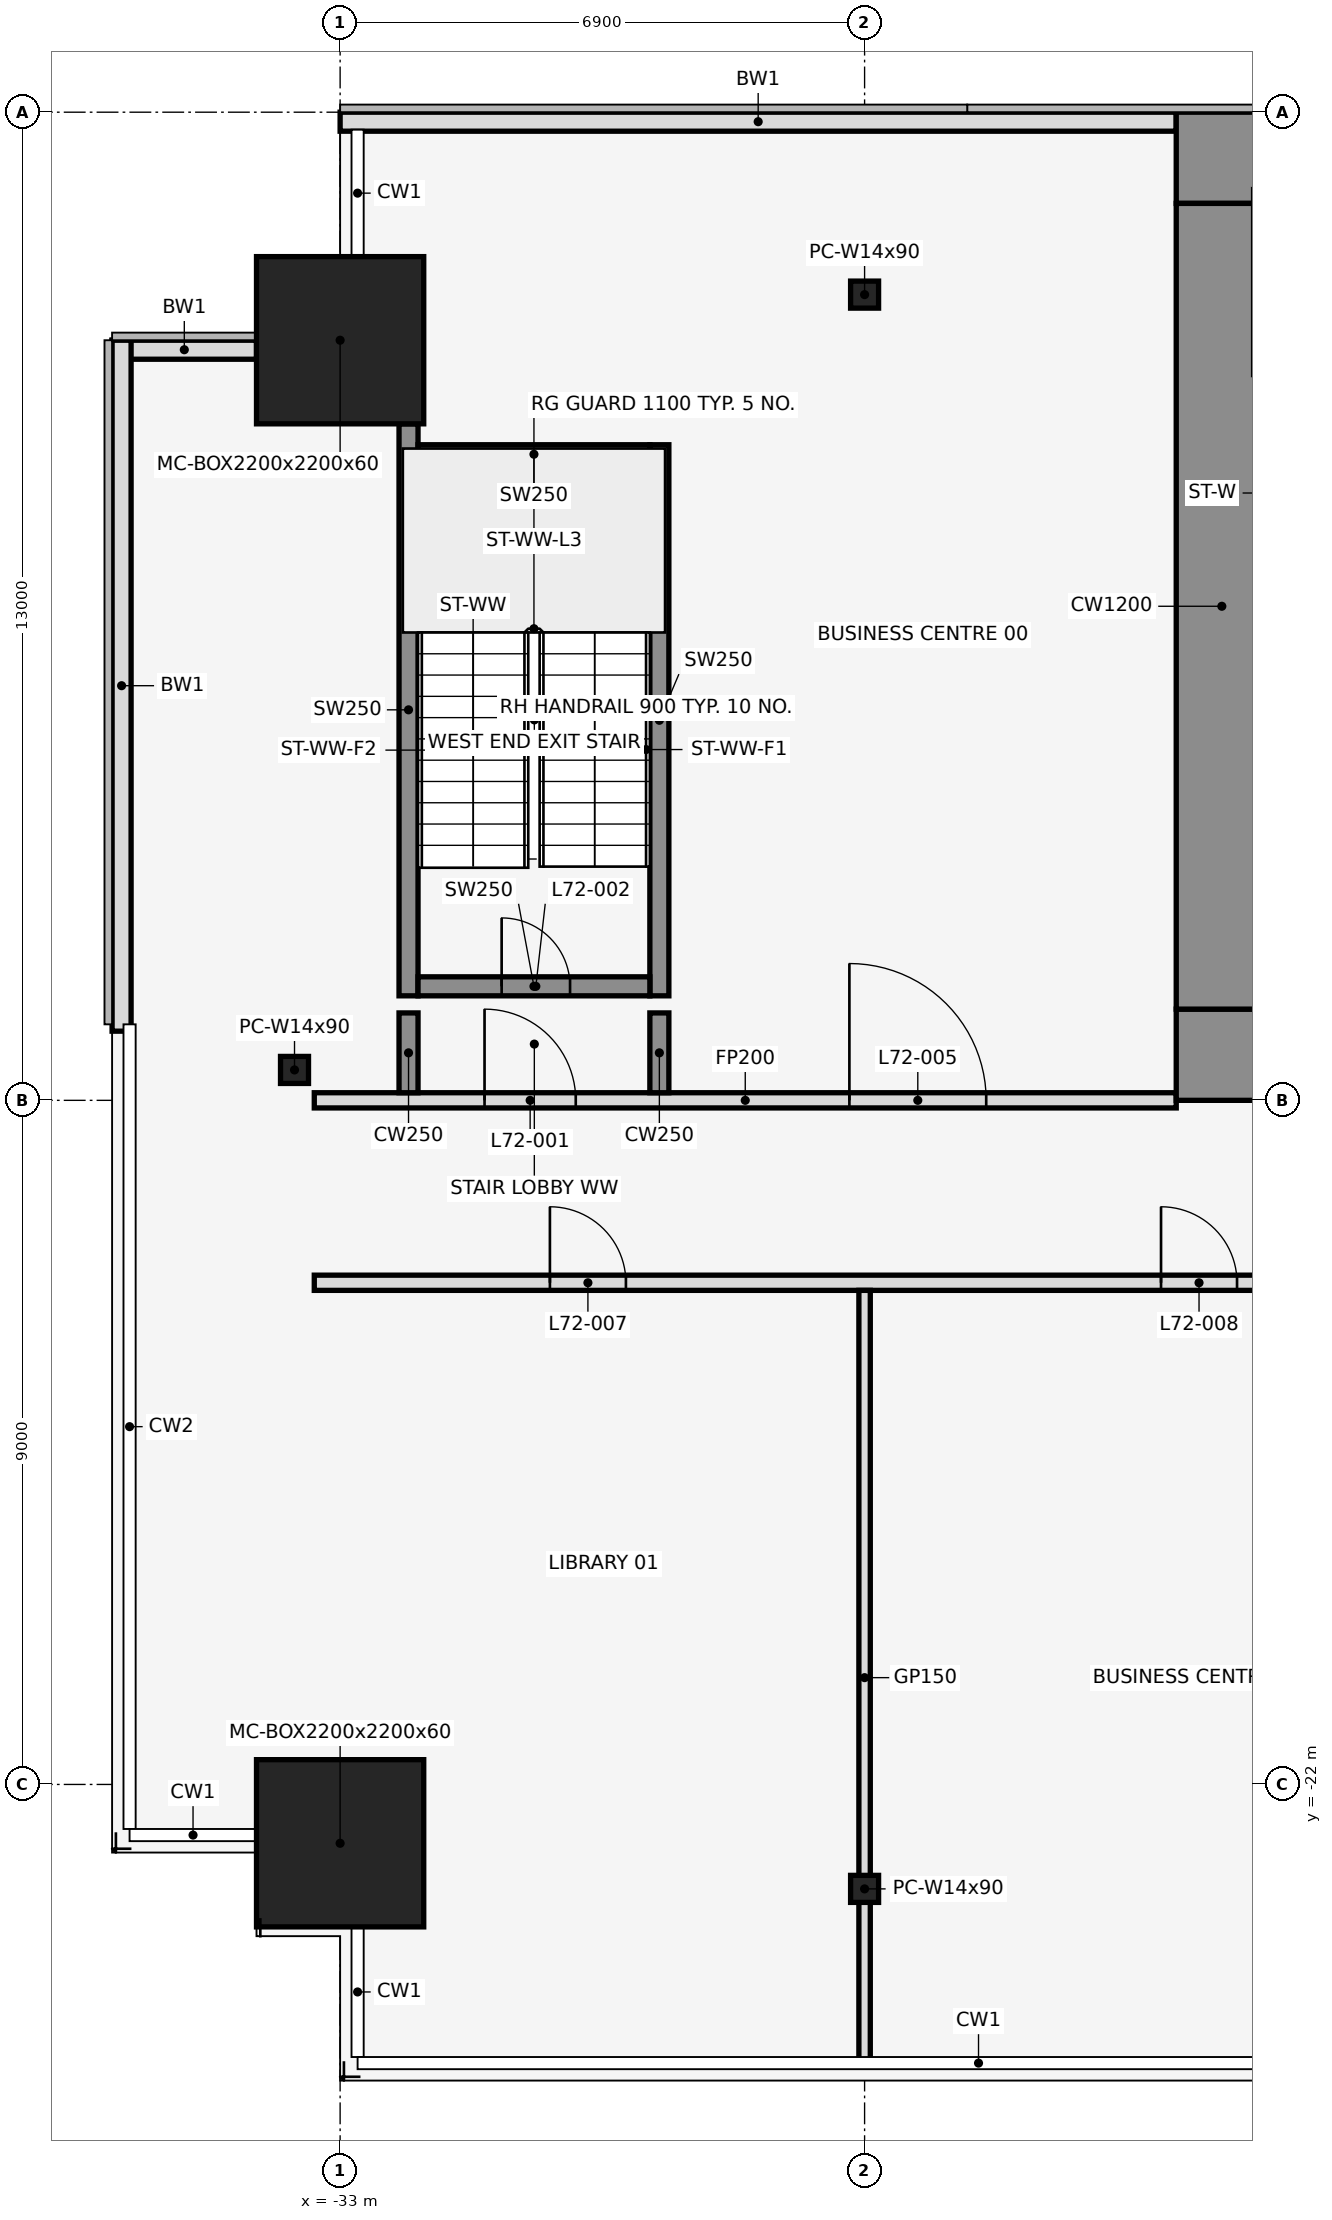
"""IFC4 building model, lengths in metres.
Left out: names, types, materials, properties, quantities, classifications, styles, units other than length and angle.
Written with IfcOpenShell. Run it as: python <this file> out.ifc"""

import sys

from ifc_helpers import new_model, si_unit, direction, frame, frame_2d, origin, origin_2d, place, context, subcontext, project, spatial, rectangle, hollow_rectangle, i_section, extrude, element, fill, save


model = new_model("IFC4")
c1 = context("Model", 3, precision=1e-05, world=origin(), true_north=direction((0.0, 1.0)))
c2 = subcontext(c1, "Body", "Model", "MODEL_VIEW")
j1 = project(units=[si_unit("LENGTHUNIT", "METRE"), si_unit("PLANEANGLEUNIT", "RADIAN")], contexts=[c1])
p1 = place(None, origin())
s1 = spatial("IfcSite", under=j1, at=p1, CompositionType="ELEMENT")
p2 = place(p1, origin())
s2 = spatial("IfcBuilding", under=s1, at=p2, CompositionType="ELEMENT")
p3 = place(p2, frame((0.0, 0.0, 320.0)))
s3 = spatial("IfcBuildingStorey", under=s2, at=p3, CompositionType="ELEMENT", Elevation=320.0)
for number, where, z_axis, x_axis in (
    (1, (-33.0, -22.774, 0.0), (0.0, 0.0, 1.0), (1.0, 0.0, 0.0)),
    (2, (-33.0, -3.0, 0.0), (0.0, 0.0, 1.0), (1.0, 0.0, 0.0)),
):
    element("IfcColumn", number, at=place(p3, frame(where, z_axis=z_axis, x_axis=x_axis)), inside=s3, PredefinedType="COLUMN", context=c2, shape_type="SweptSolid", body=[
        extrude(hollow_rectangle(XDim=2.2, YDim=2.2, WallThickness=0.06, at=origin_2d()), origin(), (0.0, 0.0, 1.0), 4.5),
    ])
for number, where, z_axis, x_axis in (
    (3, (-26.1, -23.374, 0.0), (0.0, 0.0, 1.0), (1.0, 0.0, 0.0)),
    (4, (-26.1, -2.4, 0.0), (0.0, 0.0, 1.0), (1.0, 0.0, 0.0)),
    (5, (-33.6, -12.6, 0.0), (0.0, 0.0, 1.0), (1.0, 0.0, 0.0)),
):
    element("IfcColumn", number, at=place(p3, frame(where, z_axis=z_axis, x_axis=x_axis)), inside=s3, PredefinedType="COLUMN", context=c2, shape_type="SweptSolid", body=[
        extrude(i_section(OverallWidth=0.368, OverallDepth=0.356, WebThickness=0.011, FlangeThickness=0.018, at=origin_2d()), origin(), (0.0, 0.0, 1.0), 4.5),
    ])
p4 = place(p3, frame((-22.0, -0.125, 0.0), z_axis=(0.0, 0.0, 1.0), x_axis=(-1.0, 0.0, 0.0)))
e6 = element("IfcWall", 6, at=p4, inside=s3, PredefinedType="STANDARD", context=c2, shape_type="SweptSolid", body=[
    extrude(rectangle(XDim=11.0, YDim=0.25, at=frame_2d((5.5, 0.0))), origin(), (0.0, 0.0, 1.0), 4.35),
])
p5 = place(p3, frame((-34.1, -3.125, 0.0), z_axis=(0.0, 0.0, 1.0), x_axis=(-1.0, 0.0, 0.0)))
e7 = element("IfcWall", 7, at=p5, inside=s3, PredefinedType="STANDARD", context=c2, shape_type="SweptSolid", body=[
    extrude(rectangle(XDim=1.9, YDim=0.25, at=frame_2d((0.95, 0.0))), origin(), (0.0, 0.0, 1.0), 4.35),
])
p6 = place(p3, frame((-35.875, -3.0, 0.0), z_axis=(0.0, 0.0, 1.0), x_axis=(0.0, -1.0, 0.0)))
e8 = element("IfcWall", 8, at=p6, inside=s3, PredefinedType="STANDARD", context=c2, shape_type="SweptSolid", body=[
    extrude(rectangle(XDim=9.09, YDim=0.25, at=frame_2d((4.545, 0.0))), origin(), (0.0, 0.0, 1.0), 4.35),
])
p7 = place(p3, frame((-32.1, -11.625, 0.0), z_axis=(0.0, 0.0, 1.0), x_axis=(0.0, 1.0, 0.0)))
e9 = element("IfcWall", 9, at=p7, inside=s3, PredefinedType="SHEAR", context=c2, shape_type="SweptSolid", body=[
    extrude(rectangle(XDim=7.525, YDim=0.25, at=frame_2d((3.762, 0.0))), origin(), (0.0, 0.0, 1.0), 4.5),
])
p8 = place(p3, frame((-28.8, -11.625, 0.0), z_axis=(0.0, 0.0, 1.0), x_axis=(0.0, 1.0, 0.0)))
e10 = element("IfcWall", 10, at=p8, inside=s3, PredefinedType="SHEAR", context=c2, shape_type="SweptSolid", body=[
    extrude(rectangle(XDim=7.25, YDim=0.25, at=frame_2d((3.625, 0.0))), origin(), (0.0, 0.0, 1.0), 4.5),
])
p9 = place(p3, frame((-31.975, -11.5, 0.0), z_axis=(0.0, 0.0, 1.0), x_axis=(1.0, 0.0, 0.0)))
e11 = element("IfcWall", 11, at=p9, inside=s3, PredefinedType="SHEAR", context=c2, shape_type="SweptSolid", body=[
    extrude(rectangle(XDim=3.05, YDim=0.25, at=frame_2d((1.525, 0.0))), origin(), (0.0, 0.0, 1.0), 4.5),
])
p10 = place(p9, frame((1.1, 0.0, 0.0)))
e12 = element("IfcOpeningElement", 12, at=p10, cuts=e11, PredefinedType="OPENING", context=c2, shape_type="SweptSolid", body=[
    extrude(rectangle(XDim=0.9, YDim=2.1, at=frame_2d((0.45, 1.05))), frame((0.0, 0.137, 0.0), z_axis=(0.0, -1.0, 0.0), x_axis=(1.0, 0.0, 0.0)), (0.0, 0.0, 1.0), 0.274),
])
p11 = place(p3, frame((-31.975, -4.5, 0.0), z_axis=(0.0, 0.0, 1.0), x_axis=(1.0, 0.0, 0.0)))
e13 = element("IfcWall", 13, at=p11, inside=s3, PredefinedType="SHEAR", context=c2, shape_type="SweptSolid", body=[
    extrude(rectangle(XDim=3.05, YDim=0.25, at=frame_2d((1.525, 0.0))), origin(), (0.0, 0.0, 1.0), 4.5),
])
p12 = place(p3, frame((-33.34, -15.4, 0.0), z_axis=(0.0, 0.0, 1.0), x_axis=(1.0, 0.0, 0.0)))
e14 = element("IfcWall", 14, at=p12, inside=s3, PredefinedType="PARTITIONING", context=c2, shape_type="SweptSolid", body=[
    extrude(rectangle(XDim=31.94, YDim=0.2, at=frame_2d((15.97, 0.0))), origin(), (0.0, 0.0, 1.0), 3.418),
])
p13 = place(p12, frame((3.1, 0.0, 0.0)))
e15 = element("IfcOpeningElement", 15, at=p13, cuts=e14, PredefinedType="OPENING", context=c2, shape_type="SweptSolid", body=[
    extrude(rectangle(XDim=1.0, YDim=2.1, at=frame_2d((0.5, 1.05))), frame((0.0, 0.112, 0.0), z_axis=(0.0, -1.0, 0.0), x_axis=(1.0, 0.0, 0.0)), (0.0, 0.0, 1.0), 0.224),
])
p14 = place(p12, frame((11.14, 0.0, 0.0)))
e16 = element("IfcOpeningElement", 16, at=p14, cuts=e14, PredefinedType="OPENING", context=c2, shape_type="SweptSolid", body=[
    extrude(rectangle(XDim=1.0, YDim=2.1, at=frame_2d((0.5, 1.05))), frame((0.0, 0.112, 0.0), z_axis=(0.0, -1.0, 0.0), x_axis=(1.0, 0.0, 0.0)), (0.0, 0.0, 1.0), 0.224),
])
p15 = place(p12, frame((16.94, 0.0, 0.0)))
e17 = element("IfcOpeningElement", 17, at=p15, cuts=e14, PredefinedType="OPENING", context=c2, shape_type="SweptSolid", body=[
    extrude(rectangle(XDim=0.9, YDim=2.1, at=frame_2d((0.45, 1.05))), frame((0.0, 0.112, 0.0), z_axis=(0.0, -1.0, 0.0), x_axis=(1.0, 0.0, 0.0)), (0.0, 0.0, 1.0), 0.224),
])
p16 = place(p12, frame((22.74, 0.0, 0.0)))
e18 = element("IfcOpeningElement", 18, at=p16, cuts=e14, PredefinedType="OPENING", context=c2, shape_type="SweptSolid", body=[
    extrude(rectangle(XDim=0.9, YDim=2.1, at=frame_2d((0.45, 1.05))), frame((0.0, 0.112, 0.0), z_axis=(0.0, -1.0, 0.0), x_axis=(1.0, 0.0, 0.0)), (0.0, 0.0, 1.0), 0.224),
])
p17 = place(p3, frame((-33.34, -13.0, 0.0), z_axis=(0.0, 0.0, 1.0), x_axis=(1.0, 0.0, 0.0)))
e19 = element("IfcWall", 19, at=p17, inside=s3, PredefinedType="PARTITIONING", context=c2, shape_type="SweptSolid", body=[
    extrude(rectangle(XDim=11.34, YDim=0.2, at=frame_2d((5.67, 0.0))), origin(), (0.0, 0.0, 1.0), 3.418),
])
p18 = place(p17, frame((2.24, 0.0, 0.0)))
e20 = element("IfcOpeningElement", 20, at=p18, cuts=e19, PredefinedType="OPENING", context=c2, shape_type="SweptSolid", body=[
    extrude(rectangle(XDim=1.2, YDim=2.1, at=frame_2d((0.6, 1.05))), frame((0.0, 0.112, 0.0), z_axis=(0.0, -1.0, 0.0), x_axis=(1.0, 0.0, 0.0)), (0.0, 0.0, 1.0), 0.224),
])
p19 = place(p17, frame((7.04, 0.0, 0.0)))
e21 = element("IfcOpeningElement", 21, at=p19, cuts=e19, PredefinedType="OPENING", context=c2, shape_type="SweptSolid", body=[
    extrude(rectangle(XDim=1.8, YDim=2.1, at=frame_2d((0.9, 1.05))), frame((0.0, 0.112, 0.0), z_axis=(0.0, -1.0, 0.0), x_axis=(1.0, 0.0, 0.0)), (0.0, 0.0, 1.0), 0.224),
])
for number, where, z_axis, x_axis in (
    (22, (-32.1, -12.9, 0.0), (0.0, 0.0, 1.0), (0.0, 1.0, 0.0)),
    (23, (-28.8, -12.9, 0.0), (0.0, 0.0, 1.0), (0.0, 1.0, 0.0)),
):
    element("IfcWall", number, at=place(p3, frame(where, z_axis=z_axis, x_axis=x_axis)), inside=s3, PredefinedType="SHEAR", context=c2, shape_type="SweptSolid", body=[
        extrude(rectangle(XDim=1.05, YDim=0.25, at=frame_2d((0.525, 0.0))), origin(), (0.0, 0.0, 1.0), 4.5),
    ])
p20 = place(p3, frame((-26.1, -25.69, 0.0), z_axis=(0.0, 0.0, 1.0), x_axis=(0.0, 1.0, 0.0)))
e24 = element("IfcWall", 24, at=p20, inside=s3, PredefinedType="PARTITIONING", context=c2, shape_type="SweptSolid", body=[
    extrude(rectangle(XDim=10.19, YDim=0.15, at=frame_2d((5.095, 0.0))), origin(), (0.0, 0.0, 1.0), 3.418),
])
p21 = place(p3, frame((-22.0, -0.6, 0.0), z_axis=(0.0, 0.0, 1.0), x_axis=(1.0, 0.0, 0.0)))
e25 = element("IfcWall", 25, at=p21, inside=s3, PredefinedType="SHEAR", context=c2, shape_type="SweptSolid", body=[
    extrude(rectangle(XDim=44.0, YDim=1.2, at=frame_2d((22.0, 0.0))), origin(), (0.0, 0.0, 1.0), 4.5),
])
p22 = place(p21, frame((18.55, 0.0, 0.0)))
e26 = element("IfcOpeningElement", 26, at=p22, cuts=e25, PredefinedType="OPENING", context=c2, shape_type="SweptSolid", body=[
    extrude(rectangle(XDim=0.9, YDim=2.1, at=frame_2d((0.45, 1.05))), frame((0.0, 0.612, 0.0), z_axis=(0.0, -1.0, 0.0), x_axis=(1.0, 0.0, 0.0)), (0.0, 0.0, 1.0), 1.224),
])
p23 = place(p21, frame((24.55, 0.0, 0.0)))
e27 = element("IfcOpeningElement", 27, at=p23, cuts=e25, PredefinedType="OPENING", context=c2, shape_type="SweptSolid", body=[
    extrude(rectangle(XDim=0.9, YDim=2.1, at=frame_2d((0.45, 1.05))), frame((0.0, 0.612, 0.0), z_axis=(0.0, -1.0, 0.0), x_axis=(1.0, 0.0, 0.0)), (0.0, 0.0, 1.0), 1.224),
])
p24 = place(p3, frame((-22.0, -12.4, 0.0), z_axis=(0.0, 0.0, 1.0), x_axis=(1.0, 0.0, 0.0)))
e28 = element("IfcWall", 28, at=p24, inside=s3, PredefinedType="SHEAR", context=c2, shape_type="SweptSolid", body=[
    extrude(rectangle(XDim=44.0, YDim=1.2, at=frame_2d((22.0, 0.0))), origin(), (0.0, 0.0, 1.0), 4.5),
])
p25 = place(p24, frame((2.2, 0.0, 0.0)))
e29 = element("IfcOpeningElement", 29, at=p25, cuts=e28, PredefinedType="OPENING", context=c2, shape_type="SweptSolid", body=[
    extrude(rectangle(XDim=1.2, YDim=2.1, at=frame_2d((0.6, 1.05))), frame((0.0, 0.612, 0.0), z_axis=(0.0, -1.0, 0.0), x_axis=(1.0, 0.0, 0.0)), (0.0, 0.0, 1.0), 1.224),
])
p26 = place(p24, frame((21.4, 0.0, 0.0)))
e30 = element("IfcOpeningElement", 30, at=p26, cuts=e28, PredefinedType="OPENING", context=c2, shape_type="SweptSolid", body=[
    extrude(rectangle(XDim=1.2, YDim=2.1, at=frame_2d((0.6, 1.05))), frame((0.0, 0.612, 0.0), z_axis=(0.0, -1.0, 0.0), x_axis=(1.0, 0.0, 0.0)), (0.0, 0.0, 1.0), 1.224),
])
p27 = place(p24, frame((40.6, 0.0, 0.0)))
e31 = element("IfcOpeningElement", 31, at=p27, cuts=e28, PredefinedType="OPENING", context=c2, shape_type="SweptSolid", body=[
    extrude(rectangle(XDim=1.2, YDim=2.1, at=frame_2d((0.6, 1.05))), frame((0.0, 0.612, 0.0), z_axis=(0.0, -1.0, 0.0), x_axis=(1.0, 0.0, 0.0)), (0.0, 0.0, 1.0), 1.224),
])
p28 = place(p24, frame((16.0, 0.0, 0.0)))
e32 = element("IfcOpeningElement", 32, at=p28, cuts=e28, PredefinedType="OPENING", context=c2, shape_type="SweptSolid", body=[
    extrude(rectangle(XDim=1.8, YDim=2.1, at=frame_2d((0.9, 1.05))), frame((0.0, 0.612, 0.0), z_axis=(0.0, -1.0, 0.0), x_axis=(1.0, 0.0, 0.0)), (0.0, 0.0, 1.0), 1.224),
])
p29 = place(p24, frame((6.3, 0.0, 0.0)))
e33 = element("IfcOpeningElement", 33, at=p29, cuts=e28, PredefinedType="OPENING", context=c2, shape_type="SweptSolid", body=[
    extrude(rectangle(XDim=1.2, YDim=2.1, at=frame_2d((0.6, 1.05))), frame((0.0, 0.612, 0.0), z_axis=(0.0, -1.0, 0.0), x_axis=(1.0, 0.0, 0.0)), (0.0, 0.0, 1.0), 1.224),
])
p30 = place(p24, frame((26.2, 0.0, 0.0)))
e34 = element("IfcOpeningElement", 34, at=p30, cuts=e28, PredefinedType="OPENING", context=c2, shape_type="SweptSolid", body=[
    extrude(rectangle(XDim=1.8, YDim=2.1, at=frame_2d((0.9, 1.05))), frame((0.0, 0.612, 0.0), z_axis=(0.0, -1.0, 0.0), x_axis=(1.0, 0.0, 0.0)), (0.0, 0.0, 1.0), 1.224),
])
p31 = place(p24, frame((36.5, 0.0, 0.0)))
e35 = element("IfcOpeningElement", 35, at=p31, cuts=e28, PredefinedType="OPENING", context=c2, shape_type="SweptSolid", body=[
    extrude(rectangle(XDim=1.2, YDim=2.1, at=frame_2d((0.6, 1.05))), frame((0.0, 0.612, 0.0), z_axis=(0.0, -1.0, 0.0), x_axis=(1.0, 0.0, 0.0)), (0.0, 0.0, 1.0), 1.224),
])
p32 = place(p3, frame((-21.4, -11.8, 0.0), z_axis=(0.0, 0.0, 1.0), x_axis=(0.0, 1.0, 0.0)))
e36 = element("IfcWall", 36, at=p32, inside=s3, PredefinedType="SHEAR", context=c2, shape_type="SweptSolid", body=[
    extrude(rectangle(XDim=10.6, YDim=1.2, at=frame_2d((5.3, 0.0))), origin(), (0.0, 0.0, 1.0), 4.5),
])
p33 = place(p18, origin())
e37 = element("IfcDoor", 37, at=p33, inside=s3, OperationType="SINGLE_SWING_LEFT", PredefinedType="DOOR", context=c2, shape_type="SweptSolid", body=[
    extrude(rectangle(XDim=1.2, YDim=2.1, at=frame_2d((0.6, 1.05))), frame((0.0, 0.025, 0.0), z_axis=(0.0, -1.0, 0.0), x_axis=(1.0, 0.0, 0.0)), (0.0, 0.0, 1.0), 0.05),
])
fill(e20, e37)
p34 = place(p10, origin())
e38 = element("IfcDoor", 38, at=p34, inside=s3, OperationType="SINGLE_SWING_LEFT", PredefinedType="DOOR", context=c2, shape_type="SweptSolid", body=[
    extrude(rectangle(XDim=0.9, YDim=2.1, at=frame_2d((0.45, 1.05))), frame((0.0, 0.025, 0.0), z_axis=(0.0, -1.0, 0.0), x_axis=(1.0, 0.0, 0.0)), (0.0, 0.0, 1.0), 0.05),
])
fill(e12, e38)
p35 = place(p19, origin())
e39 = element("IfcDoor", 39, at=p35, inside=s3, OperationType="SINGLE_SWING_LEFT", PredefinedType="DOOR", context=c2, shape_type="SweptSolid", body=[
    extrude(rectangle(XDim=1.8, YDim=2.1, at=frame_2d((0.9, 1.05))), frame((0.0, 0.025, 0.0), z_axis=(0.0, -1.0, 0.0), x_axis=(1.0, 0.0, 0.0)), (0.0, 0.0, 1.0), 0.05),
])
fill(e21, e39)
p36 = place(p13, frame((1.0, 0.0, 0.0), z_axis=(0.0, 0.0, 1.0), x_axis=(-1.0, 0.0, 0.0)))
e40 = element("IfcDoor", 40, at=p36, inside=s3, OperationType="SINGLE_SWING_LEFT", PredefinedType="DOOR", context=c2, shape_type="SweptSolid", body=[
    extrude(rectangle(XDim=1.0, YDim=2.1, at=frame_2d((0.5, 1.05))), frame((0.0, 0.025, 0.0), z_axis=(0.0, -1.0, 0.0), x_axis=(1.0, 0.0, 0.0)), (0.0, 0.0, 1.0), 0.05),
])
fill(e15, e40)
p37 = place(p14, frame((1.0, 0.0, 0.0), z_axis=(0.0, 0.0, 1.0), x_axis=(-1.0, 0.0, 0.0)))
e41 = element("IfcDoor", 41, at=p37, inside=s3, OperationType="SINGLE_SWING_RIGHT", PredefinedType="DOOR", context=c2, shape_type="SweptSolid", body=[
    extrude(rectangle(XDim=1.0, YDim=2.1, at=frame_2d((0.5, 1.05))), frame((0.0, 0.025, 0.0), z_axis=(0.0, -1.0, 0.0), x_axis=(1.0, 0.0, 0.0)), (0.0, 0.0, 1.0), 0.05),
])
fill(e16, e41)
save(model, sys.argv[1])
